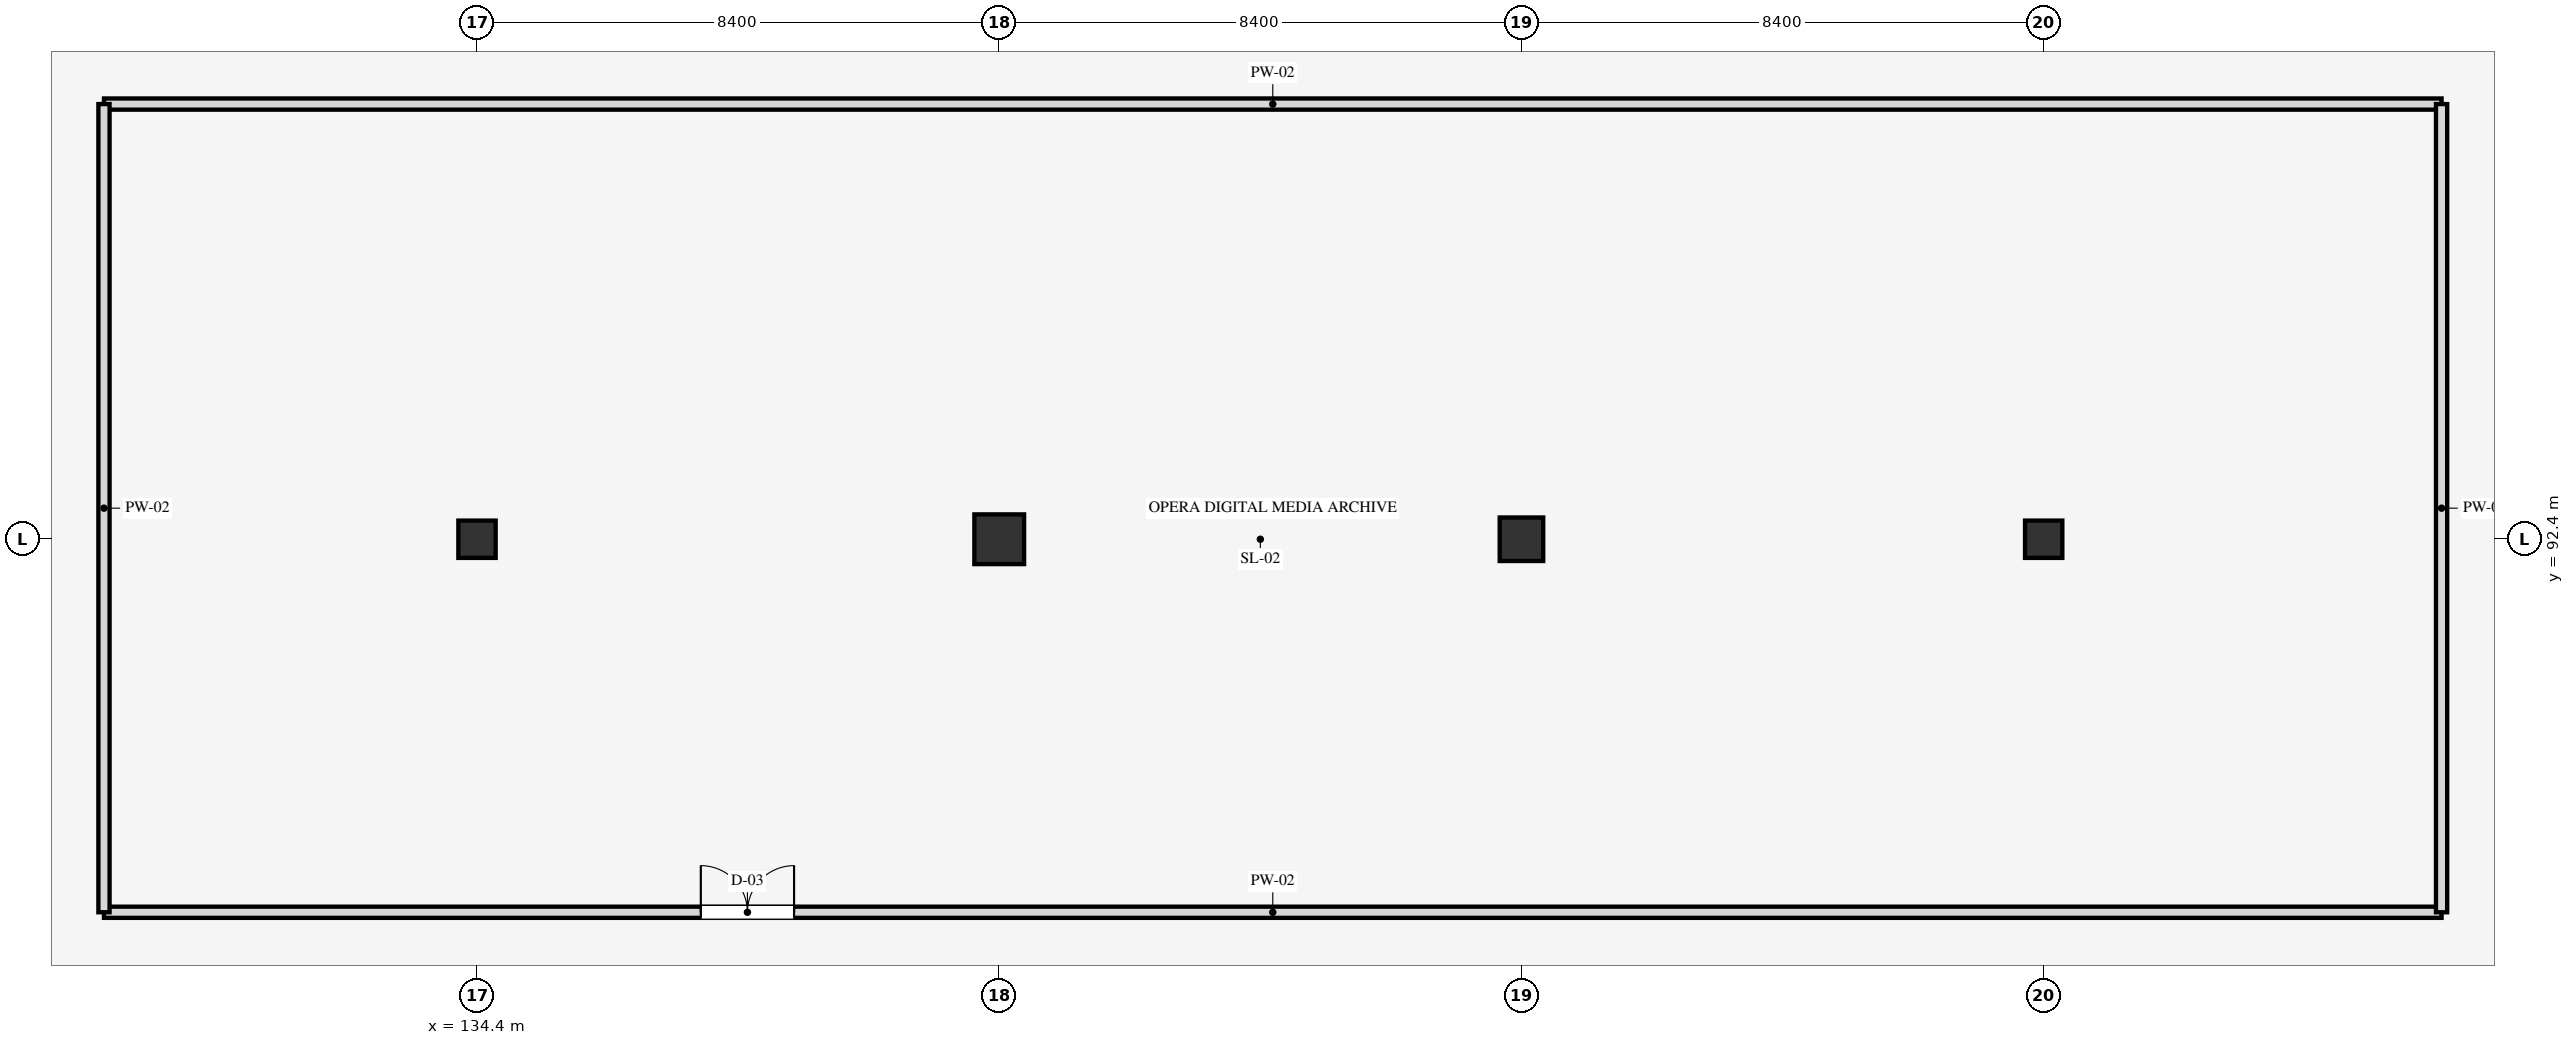
"""IFC4 building model, lengths in metres.
Left out: names, types, materials, properties, quantities, classifications, styles, units other than length and angle.
Written with IfcOpenShell. Run it as: python <this file> out.ifc"""

import sys

from ifc_helpers import new_model, si_unit, direction, frame, frame_2d, origin, origin_2d, place, context, subcontext, project, spatial, rectangle, extrude, element, fill, save


model = new_model("IFC4")
c1 = context("Model", 3, precision=1e-05, world=origin(), true_north=direction((0.0, 1.0)))
c2 = subcontext(c1, "Body", "Model", "MODEL_VIEW")
j1 = project(units=[si_unit("LENGTHUNIT", "METRE"), si_unit("PLANEANGLEUNIT", "RADIAN")], contexts=[c1])
p1 = place(None, origin())
s1 = spatial("IfcSite", under=j1, at=p1, CompositionType="ELEMENT")
p2 = place(p1, origin())
s2 = spatial("IfcBuilding", under=s1, at=p2, CompositionType="ELEMENT")
p3 = place(p2, frame((0.0, 0.0, 5.4)))
s3 = spatial("IfcBuildingStorey", under=s2, at=p3, CompositionType="ELEMENT", Elevation=5.4)
p4 = place(p3, frame((134.4, 92.4, 0.0), z_axis=(0.0, 0.0, 1.0), x_axis=(1.0, 0.0, 0.0)))
e1 = element("IfcColumn", 1, at=p4, inside=s3, PredefinedType="COLUMN", context=c2, shape_type="SweptSolid", body=[
    extrude(rectangle(XDim=0.6, YDim=0.6, at=origin_2d()), origin(), (0.0, 0.0, 1.0), 4.5),
])
p5 = place(p3, frame((142.8, 92.4, 0.0), z_axis=(0.0, 0.0, 1.0), x_axis=(1.0, 0.0, 0.0)))
e2 = element("IfcColumn", 2, at=p5, inside=s3, PredefinedType="COLUMN", context=c2, shape_type="SweptSolid", body=[
    extrude(rectangle(XDim=0.8, YDim=0.8, at=origin_2d()), origin(), (0.0, 0.0, 1.0), 4.5),
])
p6 = place(p3, frame((151.2, 92.4, 0.0), z_axis=(0.0, 0.0, 1.0), x_axis=(1.0, 0.0, 0.0)))
e3 = element("IfcColumn", 3, at=p6, inside=s3, PredefinedType="COLUMN", context=c2, shape_type="SweptSolid", body=[
    extrude(rectangle(XDim=0.7, YDim=0.7, at=origin_2d()), origin(), (0.0, 0.0, 1.0), 4.5),
])
p7 = place(p3, frame((159.6, 92.4, 0.0), z_axis=(0.0, 0.0, 1.0), x_axis=(1.0, 0.0, 0.0)))
e4 = element("IfcColumn", 4, at=p7, inside=s3, PredefinedType="COLUMN", context=c2, shape_type="SweptSolid", body=[
    extrude(rectangle(XDim=0.6, YDim=0.6, at=origin_2d()), origin(), (0.0, 0.0, 1.0), 4.5),
])
p8 = place(p3, frame((128.4, 86.4, 0.0), z_axis=(0.0, 0.0, 1.0), x_axis=(1.0, 0.0, 0.0)))
e5 = element("IfcWall", 5, at=p8, inside=s3, PredefinedType="PARTITIONING", context=c2, shape_type="SweptSolid", body=[
    extrude(rectangle(XDim=37.6, YDim=0.18, at=frame_2d((18.8, 0.0))), origin(), (0.0, 0.0, 1.0), 3.54),
])
p9 = place(p8, frame((9.6, 0.0, 0.0)))
e6 = element("IfcOpeningElement", 6, at=p9, cuts=e5, PredefinedType="OPENING", context=c2, shape_type="SweptSolid", body=[
    extrude(rectangle(XDim=1.5, YDim=2.2, at=frame_2d((0.75, 1.1))), frame((0.0, 0.1, 0.0), z_axis=(0.0, -1.0, 0.0), x_axis=(1.0, 0.0, 0.0)), (0.0, 0.0, 1.0), 0.2),
])
p10 = place(p3, frame((128.4, 99.4, 0.0), z_axis=(0.0, 0.0, 1.0), x_axis=(1.0, 0.0, 0.0)))
e7 = element("IfcWall", 7, at=p10, inside=s3, PredefinedType="PARTITIONING", context=c2, shape_type="SweptSolid", body=[
    extrude(rectangle(XDim=37.6, YDim=0.18, at=frame_2d((18.8, 0.0))), origin(), (0.0, 0.0, 1.0), 3.54),
])
for number, where, z_axis, x_axis in (
    (8, (128.4, 86.4, 0.0), (0.0, 0.0, 1.0), (0.0, 1.0, 0.0)),
    (9, (166.0, 86.4, 0.0), (0.0, 0.0, 1.0), (0.0, 1.0, 0.0)),
):
    element("IfcWall", number, at=place(p3, frame(where, z_axis=z_axis, x_axis=x_axis)), inside=s3, PredefinedType="PARTITIONING", context=c2, shape_type="SweptSolid", body=[
        extrude(rectangle(XDim=13.0, YDim=0.18, at=frame_2d((6.5, 0.0))), origin(), (0.0, 0.0, 1.0), 3.54),
    ])
p11 = place(p9, origin())
e10 = element("IfcDoor", 10, at=p11, inside=s3, OperationType="DOUBLE_DOOR_SINGLE_SWING", PredefinedType="DOOR", context=c2, shape_type="SweptSolid", body=[
    extrude(rectangle(XDim=1.5, YDim=2.2, at=frame_2d((0.75, 1.1))), frame((0.0, 0.025, 0.0), z_axis=(0.0, -1.0, 0.0), x_axis=(1.0, 0.0, 0.0)), (0.0, 0.0, 1.0), 0.05),
])
fill(e6, e10)
save(model, sys.argv[1])
